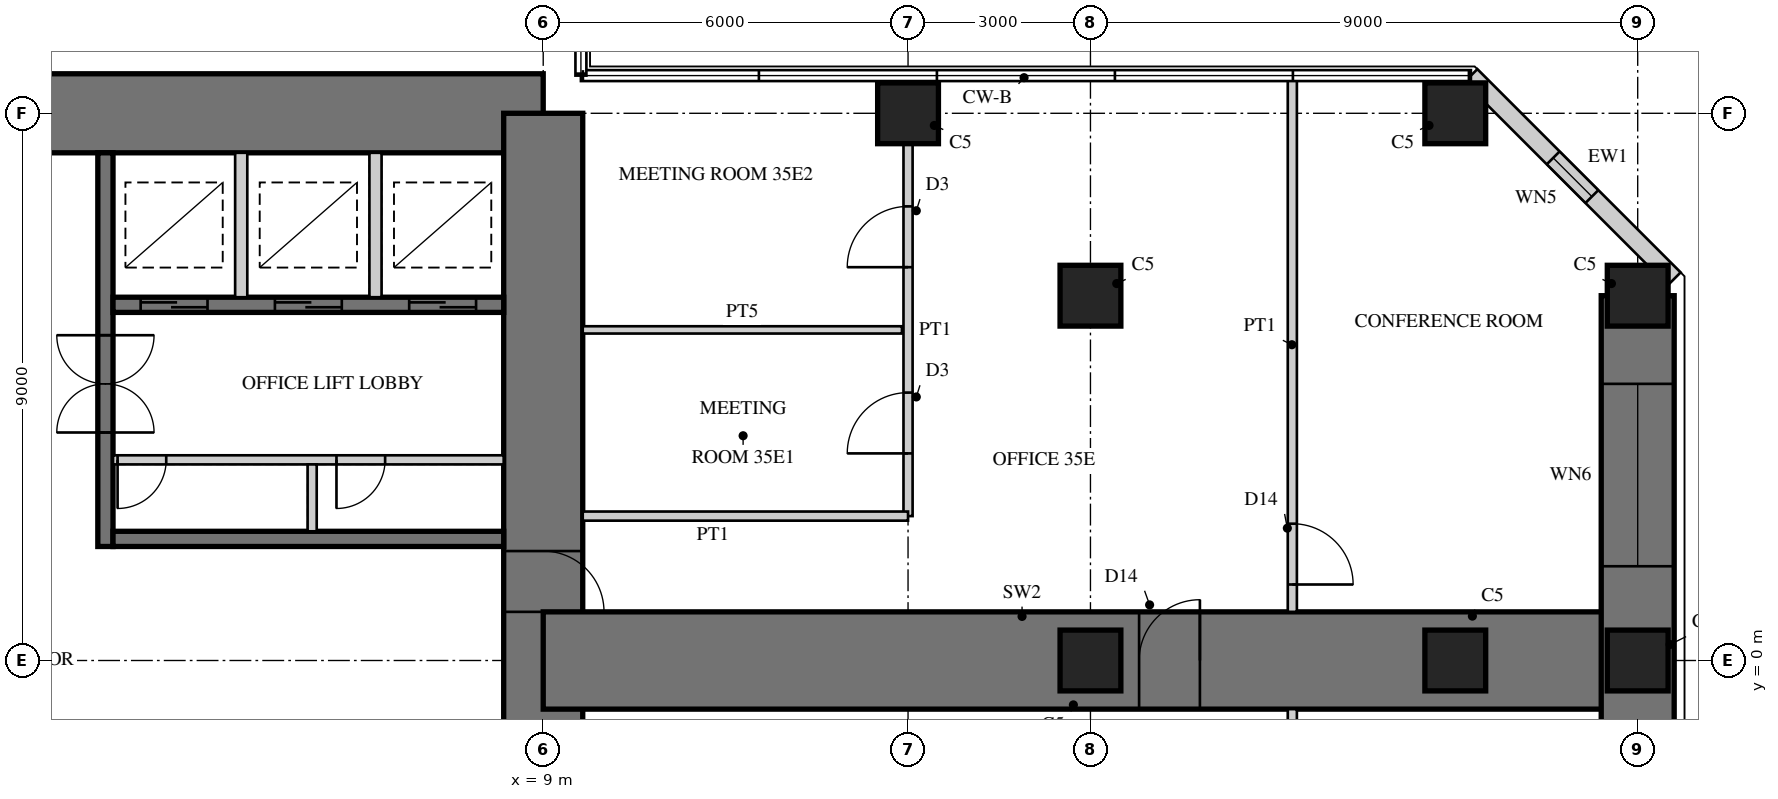
"""IFC4 building model, lengths in metres.
Left out: names, types, materials, properties, quantities, classifications, styles, units other than length and angle.
Written with IfcOpenShell. Run it as: python <this file> out.ifc"""

import sys

from ifc_helpers import new_model, si_unit, direction, frame, frame_2d, origin, origin_2d, place, context, subcontext, project, spatial, rectangle, hollow_rectangle, extrude, element, fill, save


model = new_model("IFC4")
c1 = context("Model", 3, precision=1e-05, world=origin(), true_north=direction((0.0, 1.0)))
c2 = subcontext(c1, "Body", "Model", "MODEL_VIEW")
j1 = project(units=[si_unit("LENGTHUNIT", "METRE"), si_unit("PLANEANGLEUNIT", "RADIAN")], contexts=[c1])
p1 = place(None, origin())
s1 = spatial("IfcSite", under=j1, at=p1, CompositionType="ELEMENT")
p2 = place(p1, origin())
s2 = spatial("IfcBuilding", under=s1, at=p2, CompositionType="ELEMENT")
p3 = place(p2, frame((0.0, 0.0, 144.5)))
s3 = spatial("IfcBuildingStorey", under=s2, at=p3, CompositionType="ELEMENT", Elevation=144.5)
p4 = place(p3, frame((9.0, 9.0, 0.0), z_axis=(0.0, 0.0, 1.0), x_axis=(-1.0, 0.0, 0.0)))
e1 = element("IfcWall", 1, at=p4, inside=s3, PredefinedType="SHEAR", context=c2, shape_type="SweptSolid", body=[
    extrude(rectangle(XDim=18.0, YDim=1.3, at=frame_2d((9.0, 0.0))), origin(), (0.0, 0.0, 1.0), 4.0),
])
p5 = place(p4, frame((9.8, 0.0, 0.0)))
e2 = element("IfcOpeningElement", 2, at=p5, cuts=e1, PredefinedType="OPENING", context=c2, shape_type="SweptSolid", body=[
    extrude(rectangle(XDim=1.0, YDim=2.4, at=frame_2d((0.5, 1.2))), frame((0.0, 0.66, 0.0), z_axis=(0.0, -1.0, 0.0), x_axis=(1.0, 0.0, 0.0)), (0.0, 0.0, 1.0), 1.32),
])
p6 = place(p3, frame((9.0, -9.0, 0.0), z_axis=(0.0, 0.0, 1.0), x_axis=(0.0, 1.0, 0.0)))
e3 = element("IfcWall", 3, at=p6, inside=s3, PredefinedType="SHEAR", context=c2, shape_type="SweptSolid", body=[
    extrude(rectangle(XDim=18.0, YDim=1.3, at=frame_2d((9.0, 0.0))), origin(), (0.0, 0.0, 1.0), 4.0),
])
p7 = place(p6, frame((9.8, 0.0, 0.0)))
e4 = element("IfcOpeningElement", 4, at=p7, cuts=e3, PredefinedType="OPENING", context=c2, shape_type="SweptSolid", body=[
    extrude(rectangle(XDim=1.0, YDim=2.4, at=frame_2d((0.5, 1.2))), frame((0.0, 0.66, 0.0), z_axis=(0.0, -1.0, 0.0), x_axis=(1.0, 0.0, 0.0)), (0.0, 0.0, 1.0), 1.32),
])
p8 = place(p3, frame((1.8, 1.875, 0.0), z_axis=(0.0, 0.0, 1.0), x_axis=(0.0, 1.0, 0.0)))
e5 = element("IfcWall", 5, at=p8, inside=s3, PredefinedType="SHEAR", context=c2, shape_type="SweptSolid", body=[
    extrude(rectangle(XDim=6.475, YDim=0.25, at=frame_2d((3.238, 0.0))), origin(), (0.0, 0.0, 1.0), 4.0),
])
p9 = place(p8, frame((1.875, 0.0, 0.0)))
e6 = element("IfcOpeningElement", 6, at=p9, cuts=e5, PredefinedType="OPENING", context=c2, shape_type="SweptSolid", body=[
    extrude(rectangle(XDim=1.6, YDim=2.4, at=frame_2d((0.8, 1.2))), frame((0.0, 0.135, 0.0), z_axis=(0.0, -1.0, 0.0), x_axis=(1.0, 0.0, 0.0)), (0.0, 0.0, 1.0), 0.27),
])
p10 = place(p3, frame((1.925, 2.0, 0.0), z_axis=(0.0, 0.0, 1.0), x_axis=(1.0, 0.0, 0.0)))
e7 = element("IfcWall", 7, at=p10, inside=s3, PredefinedType="SHEAR", context=c2, shape_type="SweptSolid", body=[
    extrude(rectangle(XDim=6.425, YDim=0.25, at=frame_2d((3.212, 0.0))), origin(), (0.0, 0.0, 1.0), 4.0),
])
p11 = place(p3, frame((1.925, 5.85, 0.0), z_axis=(0.0, 0.0, 1.0), x_axis=(1.0, 0.0, 0.0)))
e8 = element("IfcWall", 8, at=p11, inside=s3, PredefinedType="SHEAR", context=c2, shape_type="SweptSolid", body=[
    extrude(rectangle(XDim=6.425, YDim=0.25, at=frame_2d((3.212, 0.0))), origin(), (0.0, 0.0, 1.0), 4.0),
])
p12 = place(p11, frame((0.454, 0.0, 0.0)))
e9 = element("IfcOpeningElement", 9, at=p12, cuts=e8, PredefinedType="OPENING", context=c2, shape_type="SweptSolid", body=[
    extrude(rectangle(XDim=1.1, YDim=2.2, at=frame_2d((0.55, 1.1))), frame((0.0, 0.135, 0.0), z_axis=(0.0, -1.0, 0.0), x_axis=(1.0, 0.0, 0.0)), (0.0, 0.0, 1.0), 0.27),
])
p13 = place(p11, frame((2.663, 0.0, 0.0)))
e10 = element("IfcOpeningElement", 10, at=p13, cuts=e8, PredefinedType="OPENING", context=c2, shape_type="SweptSolid", body=[
    extrude(rectangle(XDim=1.1, YDim=2.2, at=frame_2d((0.55, 1.1))), frame((0.0, 0.135, 0.0), z_axis=(0.0, -1.0, 0.0), x_axis=(1.0, 0.0, 0.0)), (0.0, 0.0, 1.0), 0.27),
])
p14 = place(p11, frame((4.871, 0.0, 0.0)))
e11 = element("IfcOpeningElement", 11, at=p14, cuts=e8, PredefinedType="OPENING", context=c2, shape_type="SweptSolid", body=[
    extrude(rectangle(XDim=1.1, YDim=2.2, at=frame_2d((0.55, 1.1))), frame((0.0, 0.135, 0.0), z_axis=(0.0, -1.0, 0.0), x_axis=(1.0, 0.0, 0.0)), (0.0, 0.0, 1.0), 0.27),
])
p15 = place(p3, frame((1.925, 3.3, 0.0), z_axis=(0.0, 0.0, 1.0), x_axis=(1.0, 0.0, 0.0)))
e12 = element("IfcWall", 12, at=p15, inside=s3, PredefinedType="PARTITIONING", context=c2, shape_type="SweptSolid", body=[
    extrude(rectangle(XDim=6.425, YDim=0.15, at=frame_2d((3.212, 0.0))), origin(), (0.0, 0.0, 1.0), 4.0),
])
p16 = place(p15, frame((0.075, 0.0, 0.0)))
e13 = element("IfcOpeningElement", 13, at=p16, cuts=e12, PredefinedType="OPENING", context=c2, shape_type="SweptSolid", body=[
    extrude(rectangle(XDim=0.8, YDim=2.1, at=frame_2d((0.4, 1.05))), frame((0.0, 0.085, 0.0), z_axis=(0.0, -1.0, 0.0), x_axis=(1.0, 0.0, 0.0)), (0.0, 0.0, 1.0), 0.17),
])
p17 = place(p15, frame((3.675, 0.0, 0.0)))
e14 = element("IfcOpeningElement", 14, at=p17, cuts=e12, PredefinedType="OPENING", context=c2, shape_type="SweptSolid", body=[
    extrude(rectangle(XDim=0.8, YDim=2.1, at=frame_2d((0.4, 1.05))), frame((0.0, 0.085, 0.0), z_axis=(0.0, -1.0, 0.0), x_axis=(1.0, 0.0, 0.0)), (0.0, 0.0, 1.0), 0.17),
])
p18 = place(p3, frame((5.2, 2.125, 0.0), z_axis=(0.0, 0.0, 1.0), x_axis=(0.0, 1.0, 0.0)))
e15 = element("IfcWall", 15, at=p18, inside=s3, PredefinedType="PARTITIONING", context=c2, shape_type="SweptSolid", body=[
    extrude(rectangle(XDim=1.1, YDim=0.15, at=frame_2d((0.55, 0.0))), origin(), (0.0, 0.0, 1.0), 4.0),
])
for number, where, z_axis, x_axis in (
    (16, (4.033, 5.975, 0.0), (0.0, 0.0, 1.0), (0.0, 1.0, 0.0)),
    (17, (6.242, 5.975, 0.0), (0.0, 0.0, 1.0), (0.0, 1.0, 0.0)),
):
    element("IfcWall", number, at=place(p3, frame(where, z_axis=z_axis, x_axis=x_axis)), inside=s3, PredefinedType="PARTITIONING", context=c2, shape_type="SweptSolid", body=[
        extrude(rectangle(XDim=2.375, YDim=0.2, at=frame_2d((1.188, 0.0))), origin(), (0.0, 0.0, 1.0), 4.0),
    ])
p19 = place(p3, frame((9.0, 0.0, 0.0), z_axis=(0.0, 0.0, 1.0), x_axis=(1.0, 0.0, 0.0)))
e18 = element("IfcWall", 18, at=p19, inside=s3, PredefinedType="SHEAR", context=c2, shape_type="SweptSolid", body=[
    extrude(rectangle(XDim=18.0, YDim=1.6, at=frame_2d((9.0, 0.0))), origin(), (0.0, 0.0, 1.0), 4.0),
])
p20 = place(p19, frame((9.8, 0.0, 0.0)))
e19 = element("IfcOpeningElement", 19, at=p20, cuts=e18, PredefinedType="OPENING", context=c2, shape_type="SweptSolid", body=[
    extrude(rectangle(XDim=1.0, YDim=2.2, at=frame_2d((0.5, 1.1))), frame((0.0, 0.81, 0.0), z_axis=(0.0, -1.0, 0.0), x_axis=(1.0, 0.0, 0.0)), (0.0, 0.0, 1.0), 1.62),
])
p21 = place(p3, frame((27.0, -6.0, 0.0), z_axis=(0.0, 0.0, 1.0), x_axis=(0.0, 1.0, 0.0)))
e20 = element("IfcWall", 20, at=p21, inside=s3, PredefinedType="SHEAR", context=c2, shape_type="SweptSolid", body=[
    extrude(rectangle(XDim=12.0, YDim=1.2, at=frame_2d((6.0, 0.0))), origin(), (0.0, 0.0, 1.0), 4.0),
])
p22 = place(p21, frame((1.45, 0.0, 0.6)))
e21 = element("IfcOpeningElement", 21, at=p22, cuts=e20, PredefinedType="OPENING", context=c2, shape_type="SweptSolid", body=[
    extrude(rectangle(XDim=3.0, YDim=2.4, at=frame_2d((1.5, 1.2))), frame((0.0, 0.61, 0.0), z_axis=(0.0, -1.0, 0.0), x_axis=(1.0, 0.0, 0.0)), (0.0, 0.0, 1.0), 1.22),
])
p23 = place(p21, frame((7.55, 0.0, 0.6)))
e22 = element("IfcOpeningElement", 22, at=p23, cuts=e20, PredefinedType="OPENING", context=c2, shape_type="SweptSolid", body=[
    extrude(rectangle(XDim=3.0, YDim=2.4, at=frame_2d((1.5, 1.2))), frame((0.0, 0.61, 0.0), z_axis=(0.0, -1.0, 0.0), x_axis=(1.0, 0.0, 0.0)), (0.0, 0.0, 1.0), 1.22),
])
for number, where, z_axis, x_axis in (
    (23, (15.0, 9.0, 0.0), (0.0, 0.0, 1.0), (1.0, 0.0, 0.0)),
    (24, (24.0, 9.0, 0.0), (0.0, 0.0, 1.0), (1.0, 0.0, 0.0)),
    (25, (27.0, 0.0, 0.0), (0.0, 0.0, 1.0), (1.0, 0.0, 0.0)),
    (26, (27.0, 6.0, 0.0), (0.0, 0.0, 1.0), (1.0, 0.0, 0.0)),
    (27, (18.0, 0.0, 0.0), (0.0, 0.0, 1.0), (1.0, 0.0, 0.0)),
    (28, (18.0, 6.0, 0.0), (0.0, 0.0, 1.0), (1.0, 0.0, 0.0)),
    (29, (24.0, 0.0, 0.0), (0.0, 0.0, 1.0), (1.0, 0.0, 0.0)),
):
    element("IfcColumn", number, at=place(p3, frame(where, z_axis=z_axis, x_axis=x_axis)), inside=s3, PredefinedType="COLUMN", context=c2, shape_type="SweptSolid", body=[
        extrude(rectangle(XDim=1.0, YDim=1.0, at=origin_2d()), origin(), (0.0, 0.0, 1.0), 4.0),
    ])
p24 = place(p3, frame((27.6, 6.277, 0.0), z_axis=(0.0, 0.0, 1.0), x_axis=(-0.707106781187, 0.707106781187, 0.0)))
e30 = element("IfcWall", 30, at=p24, inside=s3, PredefinedType="SOLIDWALL", context=c2, shape_type="SweptSolid", body=[
    extrude(rectangle(XDim=4.728, YDim=0.3, at=frame_2d((2.364, 0.0))), origin(), (0.0, 0.0, 1.0), 3.8),
])
p25 = place(p24, frame((1.914, 0.0, 0.3)))
e31 = element("IfcOpeningElement", 31, at=p25, cuts=e30, PredefinedType="OPENING", context=c2, shape_type="SweptSolid", body=[
    extrude(rectangle(XDim=0.9, YDim=2.4, at=frame_2d((0.45, 1.2))), frame((0.0, 0.16, 0.0), z_axis=(0.0, -1.0, 0.0), x_axis=(1.0, 0.0, 0.0)), (0.0, 0.0, 1.0), 0.32),
])
p26 = place(p3, frame((15.0, 2.375, 0.0), z_axis=(0.0, 0.0, 1.0), x_axis=(0.0, 1.0, 0.0)))
e32 = element("IfcWall", 32, at=p26, inside=s3, PredefinedType="PARTITIONING", context=c2, shape_type="SweptSolid", body=[
    extrude(rectangle(XDim=6.125, YDim=0.15, at=frame_2d((3.062, 0.0))), origin(), (0.0, 0.0, 1.0), 3.0),
])
p27 = place(p26, frame((1.031, 0.0, 0.0)))
e33 = element("IfcOpeningElement", 33, at=p27, cuts=e32, PredefinedType="OPENING", context=c2, shape_type="SweptSolid", body=[
    extrude(rectangle(XDim=1.0, YDim=2.1, at=frame_2d((0.5, 1.05))), frame((0.0, 0.085, 0.0), z_axis=(0.0, -1.0, 0.0), x_axis=(1.0, 0.0, 0.0)), (0.0, 0.0, 1.0), 0.17),
])
p28 = place(p26, frame((4.094, 0.0, 0.0)))
e34 = element("IfcOpeningElement", 34, at=p28, cuts=e32, PredefinedType="OPENING", context=c2, shape_type="SweptSolid", body=[
    extrude(rectangle(XDim=1.0, YDim=2.1, at=frame_2d((0.5, 1.05))), frame((0.0, 0.085, 0.0), z_axis=(0.0, -1.0, 0.0), x_axis=(1.0, 0.0, 0.0)), (0.0, 0.0, 1.0), 0.17),
])
p29 = place(p3, frame((9.65, 2.375, 0.0), z_axis=(0.0, 0.0, 1.0), x_axis=(1.0, 0.0, 0.0)))
e35 = element("IfcWall", 35, at=p29, inside=s3, PredefinedType="PARTITIONING", context=c2, shape_type="SweptSolid", body=[
    extrude(rectangle(XDim=5.35, YDim=0.15, at=frame_2d((2.675, 0.0))), origin(), (0.0, 0.0, 1.0), 3.8),
])
p30 = place(p3, frame((9.65, 5.438, 0.0), z_axis=(0.0, 0.0, 1.0), x_axis=(1.0, 0.0, 0.0)))
e36 = element("IfcWall", 36, at=p30, inside=s3, PredefinedType="PLUMBINGWALL", context=c2, shape_type="SweptSolid", body=[
    extrude(rectangle(XDim=5.25, YDim=0.12, at=frame_2d((2.625, 0.0))), origin(), (0.0, 0.0, 1.0), 3.8),
])
p31 = place(p3, frame((21.32, 0.8, 0.0), z_axis=(0.0, 0.0, 1.0), x_axis=(0.0, 1.0, 0.0)))
e37 = element("IfcWall", 37, at=p31, inside=s3, PredefinedType="PARTITIONING", context=c2, shape_type="SweptSolid", body=[
    extrude(rectangle(XDim=8.78, YDim=0.15, at=frame_2d((4.39, 0.0))), origin(), (0.0, 0.0, 1.0), 3.8),
])
p32 = place(p31, frame((0.45, 0.0, 0.0)))
e38 = element("IfcOpeningElement", 38, at=p32, cuts=e37, PredefinedType="OPENING", context=c2, shape_type="SweptSolid", body=[
    extrude(rectangle(XDim=1.0, YDim=2.2, at=frame_2d((0.5, 1.1))), frame((0.0, 0.085, 0.0), z_axis=(0.0, -1.0, 0.0), x_axis=(1.0, 0.0, 0.0)), (0.0, 0.0, 1.0), 0.17),
])
p33 = place(p3, frame((21.32, -9.58, 0.0), z_axis=(0.0, 0.0, 1.0), x_axis=(0.0, 1.0, 0.0)))
e39 = element("IfcWall", 39, at=p33, inside=s3, PredefinedType="PARTITIONING", context=c2, shape_type="SweptSolid", body=[
    extrude(rectangle(XDim=8.78, YDim=0.15, at=frame_2d((4.39, 0.0))), origin(), (0.0, 0.0, 1.0), 3.8),
])
p34 = place(p33, frame((7.33, 0.0, 0.0)))
e40 = element("IfcOpeningElement", 40, at=p34, cuts=e39, PredefinedType="OPENING", context=c2, shape_type="SweptSolid", body=[
    extrude(rectangle(XDim=1.0, YDim=2.2, at=frame_2d((0.5, 1.1))), frame((0.0, 0.085, 0.0), z_axis=(0.0, -1.0, 0.0), x_axis=(1.0, 0.0, 0.0)), (0.0, 0.0, 1.0), 0.17),
])
p35 = place(p23, origin())
e41 = element("IfcWindow", 41, at=p35, inside=s3, PartitioningType="SINGLE_PANEL", PredefinedType="WINDOW", context=c2, shape_type="SweptSolid", body=[
    extrude(hollow_rectangle(XDim=3.0, YDim=2.4, WallThickness=0.06, at=frame_2d((1.5, 1.2))), frame((0.0, 0.03, 0.0), z_axis=(0.0, -1.0, 0.0), x_axis=(1.0, 0.0, 0.0)), (0.0, 0.0, 1.0), 0.06),
    extrude(rectangle(XDim=2.879, YDim=2.279, at=frame_2d((1.5, 1.2))), frame((0.0, 0.03, 0.0), z_axis=(0.0, -1.0, 0.0), x_axis=(1.0, 0.0, 0.0)), (0.0, 0.0, 1.0), 0.06),
])
fill(e22, e41)
p36 = place(p25, origin())
e42 = element("IfcWindow", 42, at=p36, inside=s3, PartitioningType="SINGLE_PANEL", PredefinedType="WINDOW", context=c2, shape_type="SweptSolid", body=[
    extrude(hollow_rectangle(XDim=0.9, YDim=2.4, WallThickness=0.06, at=frame_2d((0.45, 1.2))), frame((0.0, 0.03, 0.0), z_axis=(0.0, -1.0, 0.0), x_axis=(1.0, 0.0, 0.0)), (0.0, 0.0, 1.0), 0.06),
    extrude(rectangle(XDim=0.779, YDim=2.279, at=frame_2d((0.45, 1.2))), frame((0.0, 0.03, 0.0), z_axis=(0.0, -1.0, 0.0), x_axis=(1.0, 0.0, 0.0)), (0.0, 0.0, 1.0), 0.06),
])
fill(e31, e42)
p37 = place(p27, origin())
e43 = element("IfcDoor", 43, at=p37, inside=s3, OperationType="SINGLE_SWING_LEFT", PredefinedType="DOOR", context=c2, shape_type="SweptSolid", body=[
    extrude(rectangle(XDim=1.0, YDim=2.1, at=frame_2d((0.5, 1.05))), frame((0.0, 0.025, 0.0), z_axis=(0.0, -1.0, 0.0), x_axis=(1.0, 0.0, 0.0)), (0.0, 0.0, 1.0), 0.05),
])
fill(e33, e43)
p38 = place(p28, origin())
e44 = element("IfcDoor", 44, at=p38, inside=s3, OperationType="SINGLE_SWING_LEFT", PredefinedType="DOOR", context=c2, shape_type="SweptSolid", body=[
    extrude(rectangle(XDim=1.0, YDim=2.1, at=frame_2d((0.5, 1.05))), frame((0.0, 0.025, 0.0), z_axis=(0.0, -1.0, 0.0), x_axis=(1.0, 0.0, 0.0)), (0.0, 0.0, 1.0), 0.05),
])
fill(e34, e44)
p39 = place(p32, frame((1.0, 0.0, 0.0), z_axis=(0.0, 0.0, 1.0), x_axis=(-1.0, 0.0, 0.0)))
e45 = element("IfcDoor", 45, at=p39, inside=s3, OperationType="SINGLE_SWING_RIGHT", PredefinedType="DOOR", context=c2, shape_type="SweptSolid", body=[
    extrude(rectangle(XDim=1.0, YDim=2.2, at=frame_2d((0.5, 1.1))), frame((0.0, 0.025, 0.0), z_axis=(0.0, -1.0, 0.0), x_axis=(1.0, 0.0, 0.0)), (0.0, 0.0, 1.0), 0.05),
])
fill(e38, e45)
p40 = place(p20, origin())
e46 = element("IfcDoor", 46, at=p40, inside=s3, OperationType="SINGLE_SWING_RIGHT", PredefinedType="DOOR", context=c2, shape_type="SweptSolid", body=[
    extrude(rectangle(XDim=1.0, YDim=2.2, at=frame_2d((0.5, 1.1))), frame((0.0, 0.025, 0.0), z_axis=(0.0, -1.0, 0.0), x_axis=(1.0, 0.0, 0.0)), (0.0, 0.0, 1.0), 0.05),
])
fill(e19, e46)
p41 = place(p7, frame((1.0, 0.0, 0.0), z_axis=(0.0, 0.0, 1.0), x_axis=(-1.0, 0.0, 0.0)))
e47 = element("IfcDoor", 47, at=p41, inside=s3, OperationType="SINGLE_SWING_RIGHT", PredefinedType="DOOR", context=c2, shape_type="SweptSolid", body=[
    extrude(rectangle(XDim=1.0, YDim=2.4, at=frame_2d((0.5, 1.2))), frame((0.0, -0.005, 0.0), z_axis=(0.0, -1.0, 0.0), x_axis=(1.0, 0.0, 0.0)), (0.0, 0.0, 1.0), 0.05),
])
fill(e4, e47)
p42 = place(p12, origin())
e48 = element("IfcDoor", 48, at=p42, inside=s3, OperationType="DOUBLE_DOOR_SLIDING", PredefinedType="DOOR", context=c2, shape_type="SweptSolid", body=[
    extrude(rectangle(XDim=1.1, YDim=2.2, at=frame_2d((0.55, 1.1))), frame((0.0, 0.025, 0.0), z_axis=(0.0, -1.0, 0.0), x_axis=(1.0, 0.0, 0.0)), (0.0, 0.0, 1.0), 0.05),
])
fill(e9, e48)
p43 = place(p13, origin())
e49 = element("IfcDoor", 49, at=p43, inside=s3, OperationType="DOUBLE_DOOR_SLIDING", PredefinedType="DOOR", context=c2, shape_type="SweptSolid", body=[
    extrude(rectangle(XDim=1.1, YDim=2.2, at=frame_2d((0.55, 1.1))), frame((0.0, 0.025, 0.0), z_axis=(0.0, -1.0, 0.0), x_axis=(1.0, 0.0, 0.0)), (0.0, 0.0, 1.0), 0.05),
])
fill(e10, e49)
p44 = place(p14, origin())
e50 = element("IfcDoor", 50, at=p44, inside=s3, OperationType="DOUBLE_DOOR_SLIDING", PredefinedType="DOOR", context=c2, shape_type="SweptSolid", body=[
    extrude(rectangle(XDim=1.1, YDim=2.2, at=frame_2d((0.55, 1.1))), frame((0.0, 0.025, 0.0), z_axis=(0.0, -1.0, 0.0), x_axis=(1.0, 0.0, 0.0)), (0.0, 0.0, 1.0), 0.05),
])
fill(e11, e50)
p45 = place(p9, origin())
e51 = element("IfcDoor", 51, at=p45, inside=s3, OperationType="DOUBLE_DOOR_DOUBLE_SWING", PredefinedType="DOOR", context=c2, shape_type="SweptSolid", body=[
    extrude(rectangle(XDim=1.6, YDim=2.4, at=frame_2d((0.8, 1.2))), frame((0.0, 0.025, 0.0), z_axis=(0.0, -1.0, 0.0), x_axis=(1.0, 0.0, 0.0)), (0.0, 0.0, 1.0), 0.05),
])
fill(e6, e51)
p46 = place(p16, frame((0.8, 0.0, 0.0), z_axis=(0.0, 0.0, 1.0), x_axis=(-1.0, 0.0, 0.0)))
e52 = element("IfcDoor", 52, at=p46, inside=s3, OperationType="SINGLE_SWING_RIGHT", PredefinedType="DOOR", context=c2, shape_type="SweptSolid", body=[
    extrude(rectangle(XDim=0.8, YDim=2.1, at=frame_2d((0.4, 1.05))), frame((0.0, 0.025, 0.0), z_axis=(0.0, -1.0, 0.0), x_axis=(1.0, 0.0, 0.0)), (0.0, 0.0, 1.0), 0.05),
])
fill(e13, e52)
p47 = place(p17, frame((0.8, 0.0, 0.0), z_axis=(0.0, 0.0, 1.0), x_axis=(-1.0, 0.0, 0.0)))
e53 = element("IfcDoor", 53, at=p47, inside=s3, OperationType="SINGLE_SWING_RIGHT", PredefinedType="DOOR", context=c2, shape_type="SweptSolid", body=[
    extrude(rectangle(XDim=0.8, YDim=2.1, at=frame_2d((0.4, 1.05))), frame((0.0, 0.025, 0.0), z_axis=(0.0, -1.0, 0.0), x_axis=(1.0, 0.0, 0.0)), (0.0, 0.0, 1.0), 0.05),
])
fill(e14, e53)
save(model, sys.argv[1])
